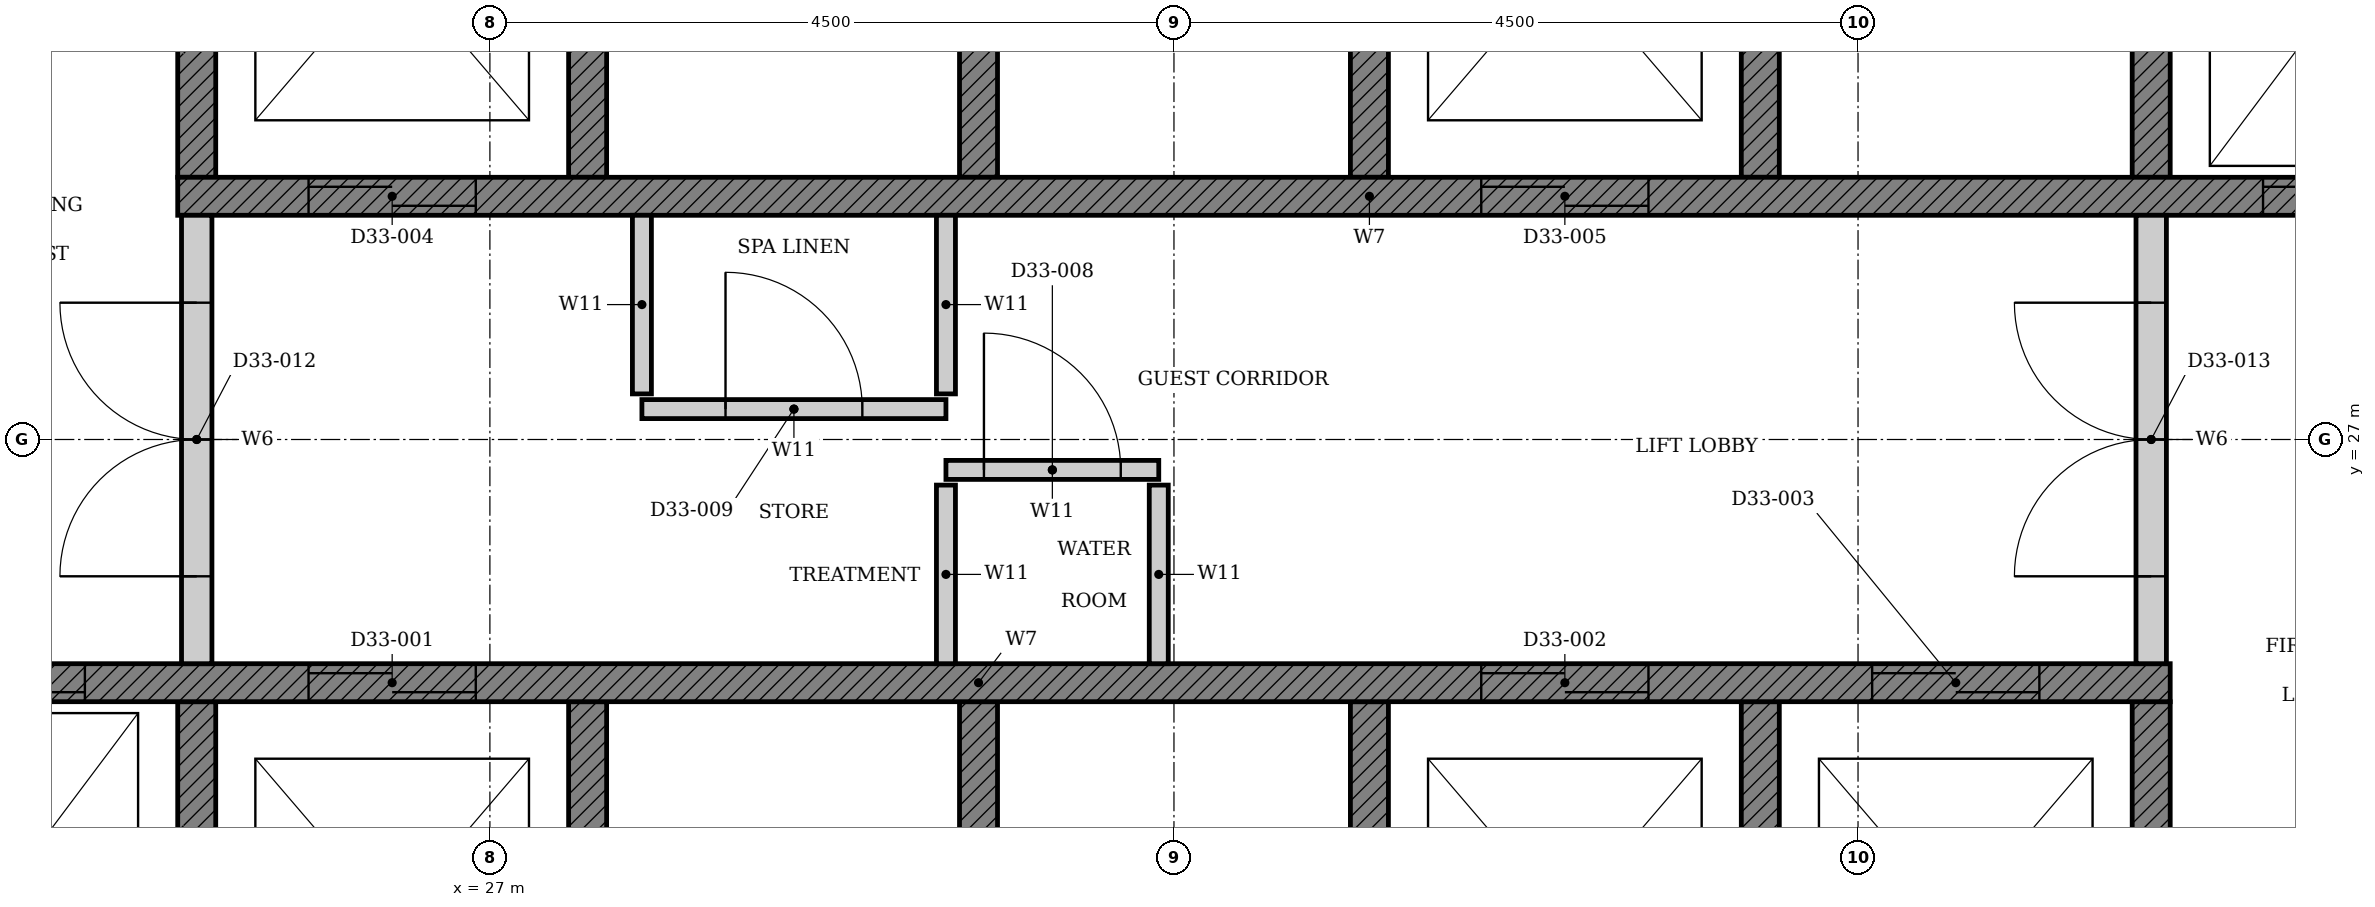
"""IFC4 building model, lengths in metres.
Left out: names, types, materials, properties, quantities, classifications, styles, units other than length and angle.
Written with IfcOpenShell. Run it as: python <this file> out.ifc"""

import sys

from ifc_helpers import new_model, si_unit, direction, frame, frame_2d, origin, place, context, subcontext, project, spatial, polyline, rectangle, outline, extrude, element, fill, save


model = new_model("IFC4")
c1 = context("Model", 3, precision=1e-05, world=origin(), true_north=direction((0.0, 1.0)))
c2 = subcontext(c1, "Body", "Model", "MODEL_VIEW")
j1 = project(units=[si_unit("LENGTHUNIT", "METRE"), si_unit("PLANEANGLEUNIT", "RADIAN")], contexts=[c1])
p1 = place(None, origin())
s1 = spatial("IfcSite", under=j1, at=p1, CompositionType="ELEMENT")
p2 = place(p1, origin())
s2 = spatial("IfcBuilding", under=s1, at=p2, CompositionType="ELEMENT")
p3 = place(p2, frame((0.0, 0.0, 133.2)))
s3 = spatial("IfcBuildingStorey", under=s2, at=p3, CompositionType="ELEMENT", Elevation=133.2)
p4 = place(p3, origin())
e1 = element("IfcWall", 1, at=p4, inside=s3, PredefinedType="SHEAR", context=c2, shape_type="SweptSolid", body=[
    extrude(outline(polyline([(22.375, 22.35), (38.053, 22.35), (38.053, 25.275), (37.803, 25.275), (37.803, 22.65), (35.482, 22.65), (35.482, 25.275), (35.232, 25.275), (35.232, 22.65), (32.911, 22.65), (32.911, 25.275), (32.661, 25.275), (32.661, 22.65), (30.339, 22.65), (30.339, 25.275), (30.089, 25.275), (30.089, 22.65), (27.768, 22.65), (27.768, 25.275), (27.518, 25.275), (27.518, 22.65), (25.197, 22.65), (25.197, 25.275), (24.947, 25.275), (24.947, 22.65), (22.625, 22.65), (22.625, 25.275), (22.375, 25.275), (22.375, 22.35)])), origin(), (0.0, 0.0, 1.0), 3.3),
])
p5 = place(p3, origin())
e2 = element("IfcWall", 2, at=p5, inside=s3, PredefinedType="SHEAR", context=c2, shape_type="SweptSolid", body=[
    extrude(outline(polyline([(24.947, 28.725), (25.197, 28.725), (25.197, 31.35), (27.518, 31.35), (27.518, 28.725), (27.768, 28.725), (27.768, 31.35), (30.089, 31.35), (30.089, 28.725), (30.339, 28.725), (30.339, 31.35), (32.661, 31.35), (32.661, 28.725), (32.911, 28.725), (32.911, 31.35), (35.232, 31.35), (35.232, 28.725), (35.482, 28.725), (35.482, 31.35), (37.803, 31.35), (37.803, 28.725), (38.053, 28.725), (38.053, 31.35), (40.375, 31.35), (40.375, 28.725), (40.625, 28.725), (40.625, 31.65), (24.947, 31.65), (24.947, 28.725)])), origin(), (0.0, 0.0, 1.0), 3.3),
])
p6 = place(p3, frame((22.375, 25.4, 0.0), z_axis=(0.0, 0.0, 1.0), x_axis=(1.0, 0.0, 0.0)))
e3 = element("IfcWall", 3, at=p6, inside=s3, PredefinedType="SHEAR", context=c2, shape_type="SweptSolid", body=[
    extrude(rectangle(XDim=15.678, YDim=0.25, at=frame_2d((7.839, 0.0))), origin(), (0.0, 0.0, 1.0), 3.3),
])
p7 = place(p6, frame((3.432, 0.0, 0.0)))
e4 = element("IfcOpeningElement", 4, at=p7, cuts=e3, PredefinedType="OPENING", context=c2, shape_type="SweptSolid", body=[
    extrude(rectangle(XDim=1.1, YDim=2.1, at=frame_2d((0.55, 1.05))), frame((0.0, 0.135, 0.0), z_axis=(0.0, -1.0, 0.0), x_axis=(1.0, 0.0, 0.0)), (0.0, 0.0, 1.0), 0.27),
])
p8 = place(p6, frame((11.146, 0.0, 0.0)))
e5 = element("IfcOpeningElement", 5, at=p8, cuts=e3, PredefinedType="OPENING", context=c2, shape_type="SweptSolid", body=[
    extrude(rectangle(XDim=1.1, YDim=2.1, at=frame_2d((0.55, 1.05))), frame((0.0, 0.135, 0.0), z_axis=(0.0, -1.0, 0.0), x_axis=(1.0, 0.0, 0.0)), (0.0, 0.0, 1.0), 0.27),
])
p9 = place(p6, frame((13.718, 0.0, 0.0)))
e6 = element("IfcOpeningElement", 6, at=p9, cuts=e3, PredefinedType="OPENING", context=c2, shape_type="SweptSolid", body=[
    extrude(rectangle(XDim=1.1, YDim=2.1, at=frame_2d((0.55, 1.05))), frame((0.0, 0.135, 0.0), z_axis=(0.0, -1.0, 0.0), x_axis=(1.0, 0.0, 0.0)), (0.0, 0.0, 1.0), 0.27),
])
p10 = place(p6, frame((0.861, 0.0, 0.0)))
e7 = element("IfcOpeningElement", 7, at=p10, cuts=e3, PredefinedType="OPENING", context=c2, shape_type="SweptSolid", body=[
    extrude(rectangle(XDim=1.1, YDim=2.1, at=frame_2d((0.55, 1.05))), frame((0.0, 0.135, 0.0), z_axis=(0.0, -1.0, 0.0), x_axis=(1.0, 0.0, 0.0)), (0.0, 0.0, 1.0), 0.27),
])
p11 = place(p3, frame((24.947, 28.6, 0.0), z_axis=(0.0, 0.0, 1.0), x_axis=(1.0, 0.0, 0.0)))
e8 = element("IfcWall", 8, at=p11, inside=s3, PredefinedType="SHEAR", context=c2, shape_type="SweptSolid", body=[
    extrude(rectangle(XDim=15.678, YDim=0.25, at=frame_2d((7.839, 0.0))), origin(), (0.0, 0.0, 1.0), 3.3),
])
p12 = place(p11, frame((0.861, 0.0, 0.0)))
e9 = element("IfcOpeningElement", 9, at=p12, cuts=e8, PredefinedType="OPENING", context=c2, shape_type="SweptSolid", body=[
    extrude(rectangle(XDim=1.1, YDim=2.1, at=frame_2d((0.55, 1.05))), frame((0.0, 0.135, 0.0), z_axis=(0.0, -1.0, 0.0), x_axis=(1.0, 0.0, 0.0)), (0.0, 0.0, 1.0), 0.27),
])
p13 = place(p11, frame((8.575, 0.0, 0.0)))
e10 = element("IfcOpeningElement", 10, at=p13, cuts=e8, PredefinedType="OPENING", context=c2, shape_type="SweptSolid", body=[
    extrude(rectangle(XDim=1.1, YDim=2.1, at=frame_2d((0.55, 1.05))), frame((0.0, 0.135, 0.0), z_axis=(0.0, -1.0, 0.0), x_axis=(1.0, 0.0, 0.0)), (0.0, 0.0, 1.0), 0.27),
])
p14 = place(p11, frame((13.718, 0.0, 0.0)))
e11 = element("IfcOpeningElement", 11, at=p14, cuts=e8, PredefinedType="OPENING", context=c2, shape_type="SweptSolid", body=[
    extrude(rectangle(XDim=1.1, YDim=2.1, at=frame_2d((0.55, 1.05))), frame((0.0, 0.135, 0.0), z_axis=(0.0, -1.0, 0.0), x_axis=(1.0, 0.0, 0.0)), (0.0, 0.0, 1.0), 0.27),
])
p15 = place(p3, frame((30.0, 26.8, 0.0), z_axis=(0.0, 0.0, 1.0), x_axis=(1.0, 0.0, 0.0)))
e12 = element("IfcWall", 12, at=p15, inside=s3, PredefinedType="PARTITIONING", context=c2, shape_type="SweptSolid", body=[
    extrude(rectangle(XDim=1.4, YDim=0.125, at=frame_2d((0.7, 0.0))), origin(), (0.0, 0.0, 1.0), 3.3),
])
p16 = place(p15, frame((0.25, 0.0, 0.0)))
e13 = element("IfcOpeningElement", 13, at=p16, cuts=e12, PredefinedType="OPENING", context=c2, shape_type="SweptSolid", body=[
    extrude(rectangle(XDim=0.9, YDim=2.1, at=frame_2d((0.45, 1.05))), frame((0.0, 0.073, 0.0), z_axis=(0.0, -1.0, 0.0), x_axis=(1.0, 0.0, 0.0)), (0.0, 0.0, 1.0), 0.145),
])
for number, where, z_axis, x_axis in (
    (14, (30.0, 25.525, 0.0), (0.0, 0.0, 1.0), (0.0, 1.0, 0.0)),
    (15, (31.4, 25.525, 0.0), (0.0, 0.0, 1.0), (0.0, 1.0, 0.0)),
):
    element("IfcWall", number, at=place(p3, frame(where, z_axis=z_axis, x_axis=x_axis)), inside=s3, PredefinedType="PARTITIONING", context=c2, shape_type="SweptSolid", body=[
        extrude(rectangle(XDim=1.175, YDim=0.125, at=frame_2d((0.587, 0.0))), origin(), (0.0, 0.0, 1.0), 3.3),
    ])
p17 = place(p3, frame((28.0, 27.2, 0.0), z_axis=(0.0, 0.0, 1.0), x_axis=(1.0, 0.0, 0.0)))
e16 = element("IfcWall", 16, at=p17, inside=s3, PredefinedType="PARTITIONING", context=c2, shape_type="SweptSolid", body=[
    extrude(rectangle(XDim=2.0, YDim=0.125, at=frame_2d((1.0, 0.0))), origin(), (0.0, 0.0, 1.0), 3.3),
])
p18 = place(p17, frame((0.55, 0.0, 0.0)))
e17 = element("IfcOpeningElement", 17, at=p18, cuts=e16, PredefinedType="OPENING", context=c2, shape_type="SweptSolid", body=[
    extrude(rectangle(XDim=0.9, YDim=2.1, at=frame_2d((0.45, 1.05))), frame((0.0, 0.073, 0.0), z_axis=(0.0, -1.0, 0.0), x_axis=(1.0, 0.0, 0.0)), (0.0, 0.0, 1.0), 0.145),
])
for number, where, z_axis, x_axis in (
    (18, (28.0, 28.475, 0.0), (0.0, 0.0, 1.0), (0.0, -1.0, 0.0)),
    (19, (30.0, 28.475, 0.0), (0.0, 0.0, 1.0), (0.0, -1.0, 0.0)),
):
    element("IfcWall", number, at=place(p3, frame(where, z_axis=z_axis, x_axis=x_axis)), inside=s3, PredefinedType="PARTITIONING", context=c2, shape_type="SweptSolid", body=[
        extrude(rectangle(XDim=1.175, YDim=0.125, at=frame_2d((0.587, 0.0))), origin(), (0.0, 0.0, 1.0), 3.3),
    ])
p19 = place(p3, frame((25.072, 25.525, 0.0), z_axis=(0.0, 0.0, 1.0), x_axis=(0.0, 1.0, 0.0)))
e20 = element("IfcWall", 20, at=p19, inside=s3, PredefinedType="PARTITIONING", context=c2, shape_type="SweptSolid", body=[
    extrude(rectangle(XDim=2.95, YDim=0.2, at=frame_2d((1.475, 0.0))), origin(), (0.0, 0.0, 1.0), 3.3),
])
p20 = place(p19, frame((0.575, 0.0, 0.0)))
e21 = element("IfcOpeningElement", 21, at=p20, cuts=e20, PredefinedType="OPENING", context=c2, shape_type="SweptSolid", body=[
    extrude(rectangle(XDim=1.8, YDim=2.1, at=frame_2d((0.9, 1.05))), frame((0.0, 0.11, 0.0), z_axis=(0.0, -1.0, 0.0), x_axis=(1.0, 0.0, 0.0)), (0.0, 0.0, 1.0), 0.22),
])
p21 = place(p3, frame((37.928, 25.525, 0.0), z_axis=(0.0, 0.0, 1.0), x_axis=(0.0, 1.0, 0.0)))
e22 = element("IfcWall", 22, at=p21, inside=s3, PredefinedType="PARTITIONING", context=c2, shape_type="SweptSolid", body=[
    extrude(rectangle(XDim=2.95, YDim=0.2, at=frame_2d((1.475, 0.0))), origin(), (0.0, 0.0, 1.0), 3.3),
])
p22 = place(p21, frame((0.575, 0.0, 0.0)))
e23 = element("IfcOpeningElement", 23, at=p22, cuts=e22, PredefinedType="OPENING", context=c2, shape_type="SweptSolid", body=[
    extrude(rectangle(XDim=1.8, YDim=2.1, at=frame_2d((0.9, 1.05))), frame((0.0, 0.11, 0.0), z_axis=(0.0, -1.0, 0.0), x_axis=(1.0, 0.0, 0.0)), (0.0, 0.0, 1.0), 0.22),
])
p23 = place(p7, origin())
e24 = element("IfcDoor", 24, at=p23, inside=s3, OperationType="DOUBLE_DOOR_SLIDING", PredefinedType="DOOR", context=c2, shape_type="SweptSolid", body=[
    extrude(rectangle(XDim=1.1, YDim=2.1, at=frame_2d((0.55, 1.05))), frame((0.0, 0.025, 0.0), z_axis=(0.0, -1.0, 0.0), x_axis=(1.0, 0.0, 0.0)), (0.0, 0.0, 1.0), 0.05),
])
fill(e4, e24)
p24 = place(p8, origin())
e25 = element("IfcDoor", 25, at=p24, inside=s3, OperationType="DOUBLE_DOOR_SLIDING", PredefinedType="DOOR", context=c2, shape_type="SweptSolid", body=[
    extrude(rectangle(XDim=1.1, YDim=2.1, at=frame_2d((0.55, 1.05))), frame((0.0, 0.025, 0.0), z_axis=(0.0, -1.0, 0.0), x_axis=(1.0, 0.0, 0.0)), (0.0, 0.0, 1.0), 0.05),
])
fill(e5, e25)
p25 = place(p9, origin())
e26 = element("IfcDoor", 26, at=p25, inside=s3, OperationType="DOUBLE_DOOR_SLIDING", PredefinedType="DOOR", context=c2, shape_type="SweptSolid", body=[
    extrude(rectangle(XDim=1.1, YDim=2.1, at=frame_2d((0.55, 1.05))), frame((0.0, 0.025, 0.0), z_axis=(0.0, -1.0, 0.0), x_axis=(1.0, 0.0, 0.0)), (0.0, 0.0, 1.0), 0.05),
])
fill(e6, e26)
p26 = place(p12, origin())
e27 = element("IfcDoor", 27, at=p26, inside=s3, OperationType="DOUBLE_DOOR_SLIDING", PredefinedType="DOOR", context=c2, shape_type="SweptSolid", body=[
    extrude(rectangle(XDim=1.1, YDim=2.1, at=frame_2d((0.55, 1.05))), frame((0.0, 0.025, 0.0), z_axis=(0.0, -1.0, 0.0), x_axis=(1.0, 0.0, 0.0)), (0.0, 0.0, 1.0), 0.05),
])
fill(e9, e27)
p27 = place(p13, origin())
e28 = element("IfcDoor", 28, at=p27, inside=s3, OperationType="DOUBLE_DOOR_SLIDING", PredefinedType="DOOR", context=c2, shape_type="SweptSolid", body=[
    extrude(rectangle(XDim=1.1, YDim=2.1, at=frame_2d((0.55, 1.05))), frame((0.0, 0.025, 0.0), z_axis=(0.0, -1.0, 0.0), x_axis=(1.0, 0.0, 0.0)), (0.0, 0.0, 1.0), 0.05),
])
fill(e10, e28)
p28 = place(p10, origin())
e29 = element("IfcDoor", 29, at=p28, inside=s3, OperationType="DOUBLE_DOOR_SLIDING", PredefinedType="DOOR", context=c2, shape_type="SweptSolid", body=[
    extrude(rectangle(XDim=1.1, YDim=2.1, at=frame_2d((0.55, 1.05))), frame((0.0, 0.025, 0.0), z_axis=(0.0, -1.0, 0.0), x_axis=(1.0, 0.0, 0.0)), (0.0, 0.0, 1.0), 0.05),
])
fill(e7, e29)
p29 = place(p14, origin())
e30 = element("IfcDoor", 30, at=p29, inside=s3, OperationType="DOUBLE_DOOR_SLIDING", PredefinedType="DOOR", context=c2, shape_type="SweptSolid", body=[
    extrude(rectangle(XDim=1.1, YDim=2.1, at=frame_2d((0.55, 1.05))), frame((0.0, 0.025, 0.0), z_axis=(0.0, -1.0, 0.0), x_axis=(1.0, 0.0, 0.0)), (0.0, 0.0, 1.0), 0.05),
])
fill(e11, e30)
p30 = place(p16, origin())
e31 = element("IfcDoor", 31, at=p30, inside=s3, OperationType="SINGLE_SWING_LEFT", PredefinedType="DOOR", context=c2, shape_type="SweptSolid", body=[
    extrude(rectangle(XDim=0.9, YDim=2.1, at=frame_2d((0.45, 1.05))), frame((0.0, 0.025, 0.0), z_axis=(0.0, -1.0, 0.0), x_axis=(1.0, 0.0, 0.0)), (0.0, 0.0, 1.0), 0.05),
])
fill(e13, e31)
p31 = place(p18, origin())
e32 = element("IfcDoor", 32, at=p31, inside=s3, OperationType="SINGLE_SWING_LEFT", PredefinedType="DOOR", context=c2, shape_type="SweptSolid", body=[
    extrude(rectangle(XDim=0.9, YDim=2.1, at=frame_2d((0.45, 1.05))), frame((0.0, 0.025, 0.0), z_axis=(0.0, -1.0, 0.0), x_axis=(1.0, 0.0, 0.0)), (0.0, 0.0, 1.0), 0.05),
])
fill(e17, e32)
p32 = place(p20, origin())
e33 = element("IfcDoor", 33, at=p32, inside=s3, OperationType="DOUBLE_DOOR_SINGLE_SWING", PredefinedType="DOOR", context=c2, shape_type="SweptSolid", body=[
    extrude(rectangle(XDim=1.8, YDim=2.1, at=frame_2d((0.9, 1.05))), frame((0.0, 0.025, 0.0), z_axis=(0.0, -1.0, 0.0), x_axis=(1.0, 0.0, 0.0)), (0.0, 0.0, 1.0), 0.05),
])
fill(e21, e33)
p33 = place(p22, origin())
e34 = element("IfcDoor", 34, at=p33, inside=s3, OperationType="DOUBLE_DOOR_SINGLE_SWING", PredefinedType="DOOR", context=c2, shape_type="SweptSolid", body=[
    extrude(rectangle(XDim=1.8, YDim=2.1, at=frame_2d((0.9, 1.05))), frame((0.0, 0.025, 0.0), z_axis=(0.0, -1.0, 0.0), x_axis=(1.0, 0.0, 0.0)), (0.0, 0.0, 1.0), 0.05),
])
fill(e23, e34)
save(model, sys.argv[1])
